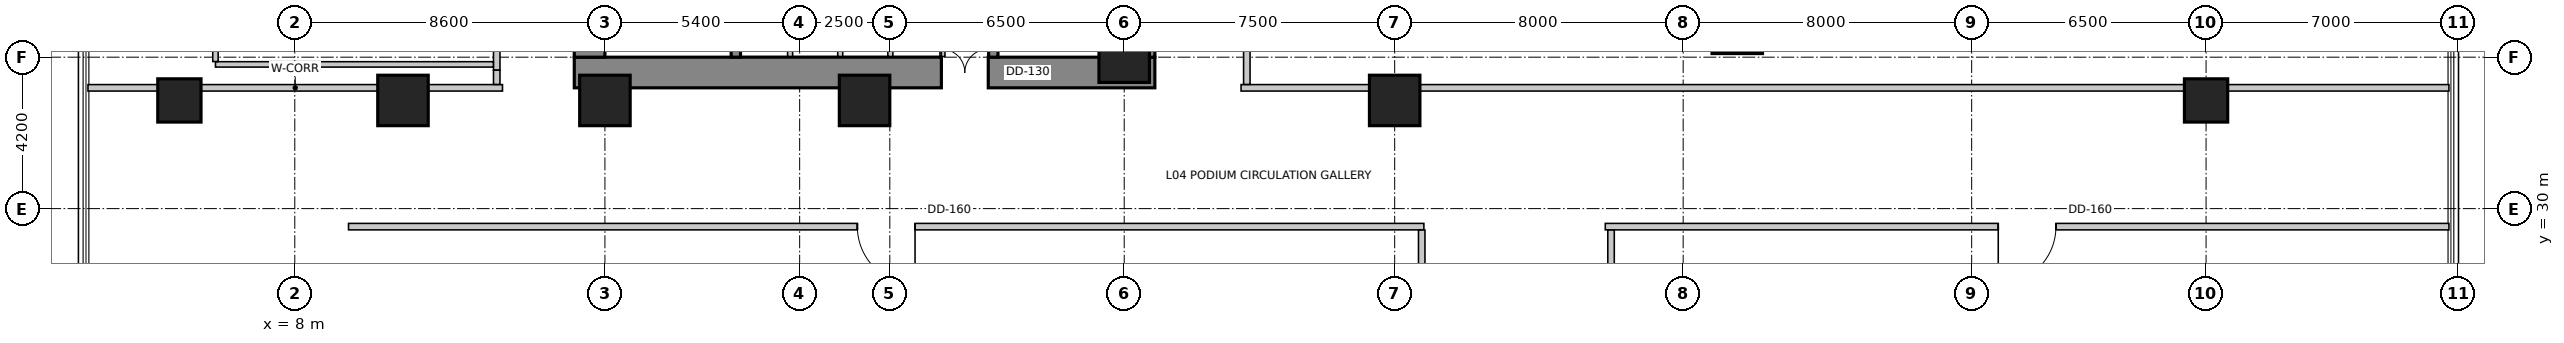
"""IFC4 building model, lengths in metres.
Left out: names, types, materials, properties, quantities, classifications, styles, units other than length and angle.
Written with IfcOpenShell. Run it as: python <this file> out.ifc"""

import sys

from ifc_helpers import new_model, si_unit, direction, frame, frame_2d, origin, origin_2d, place, context, subcontext, project, spatial, rectangle, extrude, source, transform, mapped, element, fill, save


model = new_model("IFC4")
c1 = context("Model", 3, precision=1e-05, world=origin(), true_north=direction((0.0, 1.0)))
c2 = subcontext(c1, "Body", "Model", "MODEL_VIEW")
j1 = project(units=[si_unit("LENGTHUNIT", "METRE"), si_unit("PLANEANGLEUNIT", "RADIAN")], contexts=[c1])
p1 = place(None, origin())
s1 = spatial("IfcSite", under=j1, at=p1, CompositionType="ELEMENT")
p2 = place(p1, origin())
s2 = spatial("IfcBuilding", under=s1, at=p2, CompositionType="ELEMENT")
p3 = place(p2, frame((0.0, 0.0, 16.4)))
s3 = spatial("IfcBuildingStorey", under=s2, at=p3, CompositionType="ELEMENT", Elevation=16.4)
p4 = place(p3, frame((15.75, 33.775, 0.0), z_axis=(0.0, 0.0, 1.0), x_axis=(1.0, 0.0, 0.0)))
e1 = element("IfcWall", 1, at=p4, inside=s3, PredefinedType="SHEAR", context=c2, shape_type="SweptSolid", body=[
    extrude(rectangle(XDim=16.1, YDim=0.85, at=frame_2d((8.05, 0.0))), origin(), (0.0, 0.0, 1.0), 5.2),
])
m1 = source(origin(), c2, "Body", "SweptSolid", [
    extrude(rectangle(XDim=1.3, YDim=2.15, at=frame_2d((0.65, 1.075))), frame((0.0, 0.435, 0.0), z_axis=(0.0, -1.0, 0.0), x_axis=(1.0, 0.0, 0.0)), (0.0, 0.0, 1.0), 0.87),
])
p5 = place(p4, frame((10.18, 0.0, 0.0)))
e2 = element("IfcOpeningElement", 2, at=p5, cuts=e1, PredefinedType="OPENING", context=c2, shape_type="MappedRepresentation", body=[
    mapped(m1, transform((0.0, 0.0, 0.0), scale=1.0)),
])
p6 = place(p3, frame((16.175, 34.2, 0.0), z_axis=(0.0, 0.0, 1.0), x_axis=(0.0, 1.0, 0.0)))
e3 = element("IfcWall", 3, at=p6, inside=s3, PredefinedType="SHEAR", context=c2, shape_type="SweptSolid", body=[
    extrude(rectangle(XDim=11.4, YDim=0.85, at=frame_2d((5.7, 0.0))), origin(), (0.0, 0.0, 1.0), 5.2),
])
m2 = source(origin(), c2, "Body", "SweptSolid", [
    extrude(rectangle(XDim=1.1, YDim=2.15, at=frame_2d((0.55, 1.075))), frame((0.0, 0.435, 0.0), z_axis=(0.0, -1.0, 0.0), x_axis=(1.0, 0.0, 0.0)), (0.0, 0.0, 1.0), 0.87),
])
p7 = place(p6, frame((7.15, 0.0, 0.0)))
e4 = element("IfcOpeningElement", 4, at=p7, cuts=e3, PredefinedType="OPENING", context=c2, shape_type="MappedRepresentation", body=[
    mapped(m2, transform((0.0, 0.0, 0.0), scale=1.0)),
])
p8 = place(p3, frame((31.425, 34.2, 0.0), z_axis=(0.0, 0.0, 1.0), x_axis=(0.0, 1.0, 0.0)))
e5 = element("IfcWall", 5, at=p8, inside=s3, PredefinedType="SHEAR", context=c2, shape_type="SweptSolid", body=[
    extrude(rectangle(XDim=11.4, YDim=0.85, at=frame_2d((5.7, 0.0))), origin(), (0.0, 0.0, 1.0), 5.2),
])
p9 = place(p8, frame((7.35, 0.0, 0.0)))
e6 = element("IfcOpeningElement", 6, at=p9, cuts=e5, PredefinedType="OPENING", context=c2, shape_type="MappedRepresentation", body=[
    mapped(m2, transform((0.0, 0.0, 0.0), scale=1.0)),
])
p10 = place(p3, frame((20.23, 34.2, 0.0), z_axis=(0.0, 0.0, 1.0), x_axis=(0.0, 1.0, 0.0)))
e7 = element("IfcWall", 7, at=p10, inside=s3, PredefinedType="SHEAR", context=c2, shape_type="SweptSolid", body=[
    extrude(rectangle(XDim=9.06, YDim=0.26, at=frame_2d((4.53, 0.0))), origin(), (0.0, 0.0, 1.0), 5.2),
])
m3 = source(origin(), c2, "Body", "SweptSolid", [
    extrude(rectangle(XDim=1.1, YDim=2.15, at=frame_2d((0.55, 1.075))), frame((0.0, 0.14, 0.0), z_axis=(0.0, -1.0, 0.0), x_axis=(1.0, 0.0, 0.0)), (0.0, 0.0, 1.0), 0.28),
])
p11 = place(p10, frame((7.45, 0.0, 0.0)))
e8 = element("IfcOpeningElement", 8, at=p11, cuts=e7, PredefinedType="OPENING", context=c2, shape_type="MappedRepresentation", body=[
    mapped(m3, transform((0.0, 0.0, 0.0), scale=1.0)),
])
p12 = place(p3, frame((27.37, 34.2, 0.0), z_axis=(0.0, 0.0, 1.0), x_axis=(0.0, 1.0, 0.0)))
e9 = element("IfcWall", 9, at=p12, inside=s3, PredefinedType="SHEAR", context=c2, shape_type="SweptSolid", body=[
    extrude(rectangle(XDim=9.06, YDim=0.26, at=frame_2d((4.53, 0.0))), origin(), (0.0, 0.0, 1.0), 5.2),
])
p13 = place(p12, frame((7.45, 0.0, 0.0)))
e10 = element("IfcOpeningElement", 10, at=p13, cuts=e9, PredefinedType="OPENING", context=c2, shape_type="MappedRepresentation", body=[
    mapped(m3, transform((0.0, 0.0, 0.0), scale=1.0)),
])
m4 = source(origin(), c2, "Body", "SweptSolid", [
    extrude(rectangle(XDim=1.2, YDim=1.2, at=origin_2d()), origin(), (0.0, 0.0, 1.0), 5.2),
])
p14 = place(p3, frame((4.8, 33.0, 0.0), z_axis=(0.0, 0.0, 1.0), x_axis=(1.0, 0.0, 0.0)))
e11 = element("IfcColumn", 11, at=p14, inside=s3, PredefinedType="COLUMN", context=c2, shape_type="MappedRepresentation", body=[
    mapped(m4, transform((0.0, 0.0, 0.0), scale=1.0)),
])
m5 = source(origin(), c2, "Body", "SweptSolid", [
    extrude(rectangle(XDim=1.4, YDim=1.4, at=origin_2d()), origin(), (0.0, 0.0, 1.0), 5.2),
])
for number, where, z_axis, x_axis in (
    (12, (11.0, 33.0, 0.0), (0.0, 0.0, 1.0), (1.0, 0.0, 0.0)),
    (13, (16.6, 33.0, 0.0), (0.0, 0.0, 1.0), (1.0, 0.0, 0.0)),
    (14, (23.8, 33.0, 0.0), (0.0, 0.0, 1.0), (1.0, 0.0, 0.0)),
    (15, (31.0, 34.2, 0.0), (0.0, 0.0, 1.0), (1.0, 0.0, 0.0)),
    (16, (38.5, 33.0, 0.0), (0.0, 0.0, 1.0), (1.0, 0.0, 0.0)),
    (17, (48.0, 35.0, 0.0), (0.0, 0.0, 1.0), (1.0, 0.0, 0.0)),
):
    element("IfcColumn", number, at=place(p3, frame(where, z_axis=z_axis, x_axis=x_axis)), inside=s3, PredefinedType="COLUMN", context=c2, shape_type="MappedRepresentation", body=[
        mapped(m5, transform((0.0, 0.0, 0.0), scale=1.0)),
    ])
p15 = place(p3, frame((61.0, 33.0, 0.0), z_axis=(0.0, 0.0, 1.0), x_axis=(1.0, 0.0, 0.0)))
e18 = element("IfcColumn", 18, at=p15, inside=s3, PredefinedType="COLUMN", context=c2, shape_type="MappedRepresentation", body=[
    mapped(m4, transform((0.0, 0.0, 0.0), scale=1.0)),
])
for number, where, z_axis, x_axis in (
    (19, (25.96, 34.22, 0.0), (0.0, 0.0, 1.0), (0.0, 1.0, 0.0)),
    (20, (21.735, 34.22, 0.0), (0.0, 0.0, 1.0), (0.0, 1.0, 0.0)),
    (21, (23.125, 34.22, 0.0), (0.0, 0.0, 1.0), (0.0, 1.0, 0.0)),
    (22, (24.515, 34.22, 0.0), (0.0, 0.0, 1.0), (0.0, 1.0, 0.0)),
):
    element("IfcWall", number, at=place(p3, frame(where, z_axis=z_axis, x_axis=x_axis)), inside=s3, PredefinedType="SOLIDWALL", context=c2, shape_type="SweptSolid", body=[
        extrude(rectangle(XDim=1.62, YDim=0.14, at=frame_2d((0.81, 0.0))), origin(), (0.0, 0.0, 1.0), 4.85),
    ])
p16 = place(p3, frame((2.265, 33.35, 0.0), z_axis=(0.0, 0.0, 1.0), x_axis=(1.0, 0.0, 0.0)))
e23 = element("IfcWall", 23, at=p16, inside=s3, PredefinedType="PARTITIONING", context=c2, shape_type="SweptSolid", body=[
    extrude(rectangle(XDim=11.495, YDim=0.18, at=frame_2d((5.748, 0.0))), origin(), (0.0, 0.0, 1.0), 3.642),
])
p17 = place(p3, frame((39.31, 29.5, 0.0), z_axis=(0.0, 0.0, 1.0), x_axis=(-1.0, 0.0, 0.0)))
e24 = element("IfcWall", 24, at=p17, inside=s3, PredefinedType="PARTITIONING", context=c2, shape_type="SweptSolid", body=[
    extrude(rectangle(XDim=29.82, YDim=0.18, at=frame_2d((14.91, 0.0))), origin(), (0.0, 0.0, 1.0), 3.98),
])
m6 = source(origin(), c2, "Body", "SweptSolid", [
    extrude(rectangle(XDim=1.6, YDim=2.15, at=frame_2d((0.8, 1.075))), frame((0.0, 0.1, 0.0), z_axis=(0.0, -1.0, 0.0), x_axis=(1.0, 0.0, 0.0)), (0.0, 0.0, 1.0), 0.2),
])
p18 = place(p17, frame((14.11, 0.0, 0.0)))
e25 = element("IfcOpeningElement", 25, at=p18, cuts=e24, PredefinedType="OPENING", context=c2, shape_type="MappedRepresentation", body=[
    mapped(m6, transform((0.0, 0.0, 0.0), scale=1.0)),
])
p19 = place(p3, frame((67.735, 29.5, 0.0), z_axis=(0.0, 0.0, 1.0), x_axis=(-1.0, 0.0, 0.0)))
e26 = element("IfcWall", 26, at=p19, inside=s3, PredefinedType="PARTITIONING", context=c2, shape_type="SweptSolid", body=[
    extrude(rectangle(XDim=23.395, YDim=0.18, at=frame_2d((11.698, 0.0))), origin(), (0.0, 0.0, 1.0), 3.042),
])
p20 = place(p19, frame((10.897, 0.0, 0.0)))
e27 = element("IfcOpeningElement", 27, at=p20, cuts=e26, PredefinedType="OPENING", context=c2, shape_type="MappedRepresentation", body=[
    mapped(m6, transform((0.0, 0.0, 0.0), scale=1.0)),
])
p21 = place(p3, frame((34.24, 33.35, 0.0), z_axis=(0.0, 0.0, 1.0), x_axis=(1.0, 0.0, 0.0)))
e28 = element("IfcWall", 28, at=p21, inside=s3, PredefinedType="PARTITIONING", context=c2, shape_type="SweptSolid", body=[
    extrude(rectangle(XDim=33.495, YDim=0.18, at=frame_2d((16.748, 0.0))), origin(), (0.0, 0.0, 1.0), 3.042),
])
p22 = place(p3, frame((39.25, 14.52, 0.0), z_axis=(0.0, 0.0, 1.0), x_axis=(0.0, 1.0, 0.0)))
e29 = element("IfcWall", 29, at=p22, inside=s3, PredefinedType="PARTITIONING", context=c2, shape_type="SweptSolid", body=[
    extrude(rectangle(XDim=14.886, YDim=0.18, at=frame_2d((7.443, 0.0))), origin(), (0.0, 0.0, 1.0), 3.642),
])
p23 = place(p3, frame((44.5, 29.406, 0.0), z_axis=(0.0, 0.0, 1.0), x_axis=(0.0, -1.0, 0.0)))
e30 = element("IfcWall", 30, at=p23, inside=s3, PredefinedType="PARTITIONING", context=c2, shape_type="SweptSolid", body=[
    extrude(rectangle(XDim=15.006, YDim=0.18, at=frame_2d((7.503, 0.0))), origin(), (0.0, 0.0, 1.0), 3.642),
])
p24 = place(p3, frame((13.6, 33.84, 0.0), z_axis=(0.0, 0.0, 1.0), x_axis=(0.0, 1.0, 0.0)))
e31 = element("IfcWall", 31, at=p24, inside=s3, PredefinedType="PARTITIONING", context=c2, shape_type="SweptSolid", body=[
    extrude(rectangle(XDim=5.32, YDim=0.18, at=frame_2d((2.66, 0.0))), origin(), (0.0, 0.0, 1.0), 4.85),
])
m7 = source(origin(), c2, "Body", "SweptSolid", [
    extrude(rectangle(XDim=0.9, YDim=2.15, at=frame_2d((0.45, 1.075))), frame((0.0, 0.1, 0.0), z_axis=(0.0, -1.0, 0.0), x_axis=(1.0, 0.0, 0.0)), (0.0, 0.0, 1.0), 0.2),
])
p25 = place(p24, frame((2.21, 0.0, 0.0)))
e32 = element("IfcOpeningElement", 32, at=p25, cuts=e31, PredefinedType="OPENING", context=c2, shape_type="MappedRepresentation", body=[
    mapped(m7, transform((0.0, 0.0, 0.0), scale=1.0)),
])
p26 = place(p3, frame((13.6, 33.444, 0.0), z_axis=(0.0, 0.0, 1.0), x_axis=(0.0, 1.0, 0.0)))
e33 = element("IfcWall", 33, at=p26, inside=s3, PredefinedType="PARTITIONING", context=c2, shape_type="SweptSolid", body=[
    extrude(rectangle(XDim=0.394, YDim=0.18, at=frame_2d((0.197, 0.0))), origin(), (0.0, 0.0, 1.0), 4.85),
])
p27 = place(p3, frame((34.4, 48.0, 0.0), z_axis=(0.0, 0.0, 1.0), x_axis=(0.0, -1.0, 0.0)))
e34 = element("IfcWall", 34, at=p27, inside=s3, PredefinedType="PARTITIONING", context=c2, shape_type="SweptSolid", body=[
    extrude(rectangle(XDim=14.556, YDim=0.18, at=frame_2d((7.278, 0.0))), origin(), (0.0, 0.0, 1.0), 3.892),
])
m8 = source(origin(), c2, "Body", "SweptSolid", [
    extrude(rectangle(XDim=1.4, YDim=2.15, at=frame_2d((0.7, 1.075))), frame((0.0, 0.1, 0.0), z_axis=(0.0, -1.0, 0.0), x_axis=(1.0, 0.0, 0.0)), (0.0, 0.0, 1.0), 0.2),
])
p28 = place(p27, frame((6.578, 0.0, 0.0)))
e35 = element("IfcOpeningElement", 35, at=p28, cuts=e34, PredefinedType="OPENING", context=c2, shape_type="MappedRepresentation", body=[
    mapped(m8, transform((0.0, 0.0, 0.0), scale=1.0)),
])
p29 = place(p3, frame((13.506, 34.0, 0.0), z_axis=(0.0, 0.0, 1.0), x_axis=(-1.0, 0.0, 0.0)))
e36 = element("IfcWall", 36, at=p29, inside=s3, PredefinedType="PARTITIONING", context=c2, shape_type="SweptSolid", body=[
    extrude(rectangle(XDim=7.706, YDim=0.15, at=frame_2d((3.853, 0.0))), origin(), (0.0, 0.0, 1.0), 3.892),
])
p30 = place(p3, frame((5.8, 34.079, 0.0), z_axis=(0.0, 0.0, 1.0), x_axis=(0.0, 1.0, 0.0)))
e37 = element("IfcWall", 37, at=p30, inside=s3, PredefinedType="PARTITIONING", context=c2, shape_type="SweptSolid", body=[
    extrude(rectangle(XDim=4.842, YDim=0.15, at=frame_2d((2.421, 0.0))), origin(), (0.0, 0.0, 1.0), 4.85),
])
m9 = source(origin(), c2, "Body", "SweptSolid", [
    extrude(rectangle(XDim=1.3, YDim=2.15, at=frame_2d((0.65, 1.075))), frame((0.0, 0.025, 0.0), z_axis=(0.0, -1.0, 0.0), x_axis=(1.0, 0.0, 0.0)), (0.0, 0.0, 1.0), 0.05),
])
p31 = place(p5, origin())
e38 = element("IfcDoor", 38, at=p31, inside=s3, OperationType="DOUBLE_DOOR_SINGLE_SWING", PredefinedType="DOOR", context=c2, shape_type="MappedRepresentation", body=[
    mapped(m9, transform((0.0, 0.0, 0.0), scale=1.0)),
])
fill(e2, e38)
m10 = source(origin(), c2, "Body", "SweptSolid", [
    extrude(rectangle(XDim=1.6, YDim=2.15, at=frame_2d((0.8, 1.075))), frame((0.0, 0.025, 0.0), z_axis=(0.0, -1.0, 0.0), x_axis=(1.0, 0.0, 0.0)), (0.0, 0.0, 1.0), 0.05),
])
p32 = place(p18, origin())
e39 = element("IfcDoor", 39, at=p32, inside=s3, OperationType="SINGLE_SWING_LEFT", PredefinedType="DOOR", context=c2, shape_type="MappedRepresentation", body=[
    mapped(m10, transform((0.0, 0.0, 0.0), scale=1.0)),
])
fill(e25, e39)
p33 = place(p20, origin())
e40 = element("IfcDoor", 40, at=p33, inside=s3, OperationType="SINGLE_SWING_RIGHT", PredefinedType="DOOR", context=c2, shape_type="MappedRepresentation", body=[
    mapped(m10, transform((0.0, 0.0, 0.0), scale=1.0)),
])
fill(e27, e40)
save(model, sys.argv[1])
